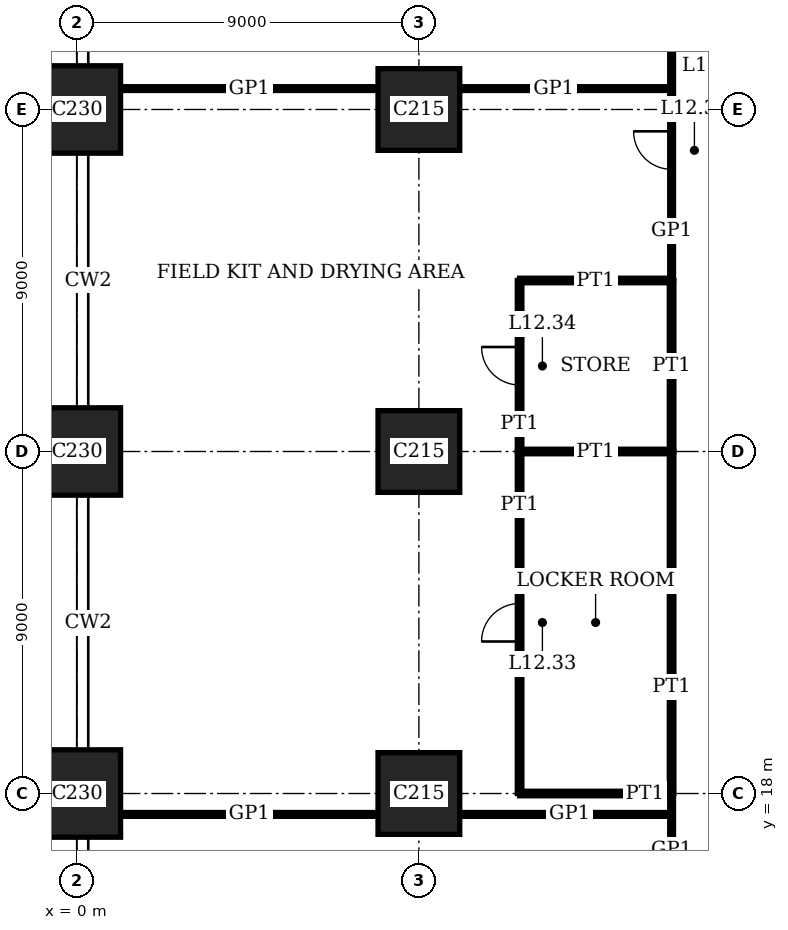
"""IFC4 building model, lengths in metres.
Left out: names, types, materials, properties, quantities, classifications, styles, units other than length and angle.
Written with IfcOpenShell. Run it as: python <this file> out.ifc"""

import sys

from ifc_helpers import new_model, si_unit, direction, frame, frame_2d, origin, origin_2d, place, context, subcontext, project, spatial, rectangle, extrude, element, fill, save


model = new_model("IFC4")
c1 = context("Model", 3, precision=1e-05, world=origin(), true_north=direction((0.0, 1.0)))
c2 = subcontext(c1, "Body", "Model", "MODEL_VIEW")
j1 = project(units=[si_unit("LENGTHUNIT", "METRE"), si_unit("PLANEANGLEUNIT", "RADIAN")], contexts=[c1])
p1 = place(None, origin())
s1 = spatial("IfcSite", under=j1, at=p1, CompositionType="ELEMENT")
p2 = place(p1, origin())
s2 = spatial("IfcBuilding", under=s1, at=p2, CompositionType="ELEMENT")
p3 = place(p2, frame((0.0, 0.0, 51.8)))
s3 = spatial("IfcBuildingStorey", under=s2, at=p3, CompositionType="ELEMENT", Elevation=51.8)
for number, where, z_axis, x_axis in (
    (1, (0.0, 18.0, 0.0), (0.0, 0.0, 1.0), (1.0, 0.0, 0.0)),
    (2, (0.0, 27.0, 0.0), (0.0, 0.0, 1.0), (1.0, 0.0, 0.0)),
    (3, (0.0, 36.0, 0.0), (0.0, 0.0, 1.0), (1.0, 0.0, 0.0)),
):
    element("IfcColumn", number, at=place(p3, frame(where, z_axis=z_axis, x_axis=x_axis)), inside=s3, PredefinedType="COLUMN", context=c2, shape_type="SweptSolid", body=[
        extrude(rectangle(XDim=2.3, YDim=2.3, at=origin_2d()), origin(), (0.0, 0.0, 1.0), 4.0),
    ])
for number, where, z_axis, x_axis in (
    (4, (9.0, 18.0, 0.0), (0.0, 0.0, 1.0), (1.0, 0.0, 0.0)),
    (5, (9.0, 27.0, 0.0), (0.0, 0.0, 1.0), (1.0, 0.0, 0.0)),
    (6, (9.0, 36.0, 0.0), (0.0, 0.0, 1.0), (1.0, 0.0, 0.0)),
):
    element("IfcColumn", number, at=place(p3, frame(where, z_axis=z_axis, x_axis=x_axis)), inside=s3, PredefinedType="COLUMN", context=c2, shape_type="SweptSolid", body=[
        extrude(rectangle(XDim=2.15, YDim=2.15, at=origin_2d()), origin(), (0.0, 0.0, 1.0), 4.0),
    ])
p4 = place(p3, frame((1.15, 17.45, 0.0), z_axis=(0.0, 0.0, 1.0), x_axis=(1.0, 0.0, 0.0)))
e7 = element("IfcWall", 7, at=p4, inside=s3, PredefinedType="PARTITIONING", context=c2, shape_type="SweptSolid", body=[
    extrude(rectangle(XDim=6.775, YDim=0.1, at=frame_2d((3.388, 0.0))), origin(), (0.0, 0.0, 1.0), 3.75),
])
p5 = place(p3, frame((10.075, 17.45, 0.0), z_axis=(0.0, 0.0, 1.0), x_axis=(1.0, 0.0, 0.0)))
e8 = element("IfcWall", 8, at=p5, inside=s3, PredefinedType="PARTITIONING", context=c2, shape_type="SweptSolid", body=[
    extrude(rectangle(XDim=5.575, YDim=0.1, at=frame_2d((2.788, 0.0))), origin(), (0.0, 0.0, 1.0), 3.75),
])
for number, where, z_axis, x_axis in (
    (9, (11.65, 18.0, 0.0), (0.0, 0.0, 1.0), (1.0, 0.0, 0.0)),
    (10, (11.65, 27.0, 0.0), (0.0, 0.0, 1.0), (1.0, 0.0, 0.0)),
):
    element("IfcWall", number, at=place(p3, frame(where, z_axis=z_axis, x_axis=x_axis)), inside=s3, PredefinedType="PARTITIONING", context=c2, shape_type="SweptSolid", body=[
        extrude(rectangle(XDim=4.0, YDim=0.12, at=frame_2d((2.0, 0.0))), origin(), (0.0, 0.0, 1.0), 3.05),
    ])
p6 = place(p3, frame((11.65, 31.5, 0.0), z_axis=(0.0, 0.0, 1.0), x_axis=(1.0, 0.0, 0.0)))
e11 = element("IfcWall", 11, at=p6, inside=s3, PredefinedType="PARTITIONING", context=c2, shape_type="SweptSolid", body=[
    extrude(rectangle(XDim=4.0, YDim=0.12, at=frame_2d((2.0, 0.0))), origin(), (0.0, 0.0, 1.0), 3.1),
])
p7 = place(p3, frame((1.15, 36.55, 0.0), z_axis=(0.0, 0.0, 1.0), x_axis=(1.0, 0.0, 0.0)))
e12 = element("IfcWall", 12, at=p7, inside=s3, PredefinedType="PARTITIONING", context=c2, shape_type="SweptSolid", body=[
    extrude(rectangle(XDim=6.775, YDim=0.1, at=frame_2d((3.388, 0.0))), origin(), (0.0, 0.0, 1.0), 3.75),
])
p8 = place(p3, frame((10.075, 36.55, 0.0), z_axis=(0.0, 0.0, 1.0), x_axis=(1.0, 0.0, 0.0)))
e13 = element("IfcWall", 13, at=p8, inside=s3, PredefinedType="PARTITIONING", context=c2, shape_type="SweptSolid", body=[
    extrude(rectangle(XDim=5.575, YDim=0.1, at=frame_2d((2.788, 0.0))), origin(), (0.0, 0.0, 1.0), 3.75),
])
p9 = place(p3, frame((11.65, 18.0, 0.0), z_axis=(0.0, 0.0, 1.0), x_axis=(0.0, 1.0, 0.0)))
e14 = element("IfcWall", 14, at=p9, inside=s3, PredefinedType="PARTITIONING", context=c2, shape_type="SweptSolid", body=[
    extrude(rectangle(XDim=9.0, YDim=0.12, at=frame_2d((4.5, 0.0))), origin(), (0.0, 0.0, 1.0), 3.75),
])
p10 = place(p9, frame((4.0, 0.0, 0.0)))
e15 = element("IfcOpeningElement", 15, at=p10, cuts=e14, PredefinedType="OPENING", context=c2, shape_type="SweptSolid", body=[
    extrude(rectangle(XDim=1.0, YDim=2.4, at=frame_2d((0.5, 1.2))), frame((0.0, 0.07, 0.0), z_axis=(0.0, -1.0, 0.0), x_axis=(1.0, 0.0, 0.0)), (0.0, 0.0, 1.0), 0.14),
])
p11 = place(p3, frame((11.65, 27.0, 0.0), z_axis=(0.0, 0.0, 1.0), x_axis=(0.0, 1.0, 0.0)))
e16 = element("IfcWall", 16, at=p11, inside=s3, PredefinedType="PARTITIONING", context=c2, shape_type="SweptSolid", body=[
    extrude(rectangle(XDim=4.5, YDim=0.12, at=frame_2d((2.25, 0.0))), origin(), (0.0, 0.0, 1.0), 3.75),
])
p12 = place(p11, frame((1.75, 0.0, 0.0)))
e17 = element("IfcOpeningElement", 17, at=p12, cuts=e16, PredefinedType="OPENING", context=c2, shape_type="SweptSolid", body=[
    extrude(rectangle(XDim=1.0, YDim=2.4, at=frame_2d((0.5, 1.2))), frame((0.0, 0.07, 0.0), z_axis=(0.0, -1.0, 0.0), x_axis=(1.0, 0.0, 0.0)), (0.0, 0.0, 1.0), 0.14),
])
p13 = place(p3, frame((15.65, 18.0, 0.0), z_axis=(0.0, 0.0, 1.0), x_axis=(0.0, 1.0, 0.0)))
e18 = element("IfcWall", 18, at=p13, inside=s3, PredefinedType="PARTITIONING", context=c2, shape_type="SweptSolid", body=[
    extrude(rectangle(XDim=9.0, YDim=0.12, at=frame_2d((4.5, 0.0))), origin(), (0.0, 0.0, 1.0), 3.75),
])
p14 = place(p3, frame((15.65, 27.0, 0.0), z_axis=(0.0, 0.0, 1.0), x_axis=(0.0, 1.0, 0.0)))
e19 = element("IfcWall", 19, at=p14, inside=s3, PredefinedType="PARTITIONING", context=c2, shape_type="SweptSolid", body=[
    extrude(rectangle(XDim=4.5, YDim=0.12, at=frame_2d((2.25, 0.0))), origin(), (0.0, 0.0, 1.0), 3.75),
])
p15 = place(p3, frame((15.65, 15.65, 0.0), z_axis=(0.0, 0.0, 1.0), x_axis=(0.0, 1.0, 0.0)))
e20 = element("IfcWall", 20, at=p15, inside=s3, PredefinedType="PARTITIONING", context=c2, shape_type="SweptSolid", body=[
    extrude(rectangle(XDim=2.35, YDim=0.1, at=frame_2d((1.175, 0.0))), origin(), (0.0, 0.0, 1.0), 3.75),
])
p16 = place(p3, frame((15.65, 31.5, 0.0), z_axis=(0.0, 0.0, 1.0), x_axis=(0.0, 1.0, 0.0)))
e21 = element("IfcWall", 21, at=p16, inside=s3, PredefinedType="PARTITIONING", context=c2, shape_type="SweptSolid", body=[
    extrude(rectangle(XDim=6.85, YDim=0.1, at=frame_2d((3.425, 0.0))), origin(), (0.0, 0.0, 1.0), 3.75),
])
p17 = place(p16, frame((2.925, 0.0, 0.0)))
e22 = element("IfcOpeningElement", 22, at=p17, cuts=e21, PredefinedType="OPENING", context=c2, shape_type="SweptSolid", body=[
    extrude(rectangle(XDim=1.0, YDim=2.4, at=frame_2d((0.5, 1.2))), frame((0.0, 0.06, 0.0), z_axis=(0.0, -1.0, 0.0), x_axis=(1.0, 0.0, 0.0)), (0.0, 0.0, 1.0), 0.12),
])
p18 = place(p10, origin())
e23 = element("IfcDoor", 23, at=p18, inside=s3, OperationType="SINGLE_SWING_RIGHT", PredefinedType="DOOR", context=c2, shape_type="SweptSolid", body=[
    extrude(rectangle(XDim=1.0, YDim=2.4, at=frame_2d((0.5, 1.2))), frame((0.0, 0.025, 0.0), z_axis=(0.0, -1.0, 0.0), x_axis=(1.0, 0.0, 0.0)), (0.0, 0.0, 1.0), 0.05),
])
fill(e15, e23)
p19 = place(p12, origin())
e24 = element("IfcDoor", 24, at=p19, inside=s3, OperationType="SINGLE_SWING_LEFT", PredefinedType="DOOR", context=c2, shape_type="SweptSolid", body=[
    extrude(rectangle(XDim=1.0, YDim=2.4, at=frame_2d((0.5, 1.2))), frame((0.0, 0.025, 0.0), z_axis=(0.0, -1.0, 0.0), x_axis=(1.0, 0.0, 0.0)), (0.0, 0.0, 1.0), 0.05),
])
fill(e17, e24)
p20 = place(p17, origin())
e25 = element("IfcDoor", 25, at=p20, inside=s3, OperationType="SINGLE_SWING_LEFT", PredefinedType="DOOR", context=c2, shape_type="SweptSolid", body=[
    extrude(rectangle(XDim=1.0, YDim=2.4, at=frame_2d((0.5, 1.2))), frame((0.0, 0.02, 0.0), z_axis=(0.0, -1.0, 0.0), x_axis=(1.0, 0.0, 0.0)), (0.0, 0.0, 1.0), 0.04),
])
fill(e22, e25)
save(model, sys.argv[1])
